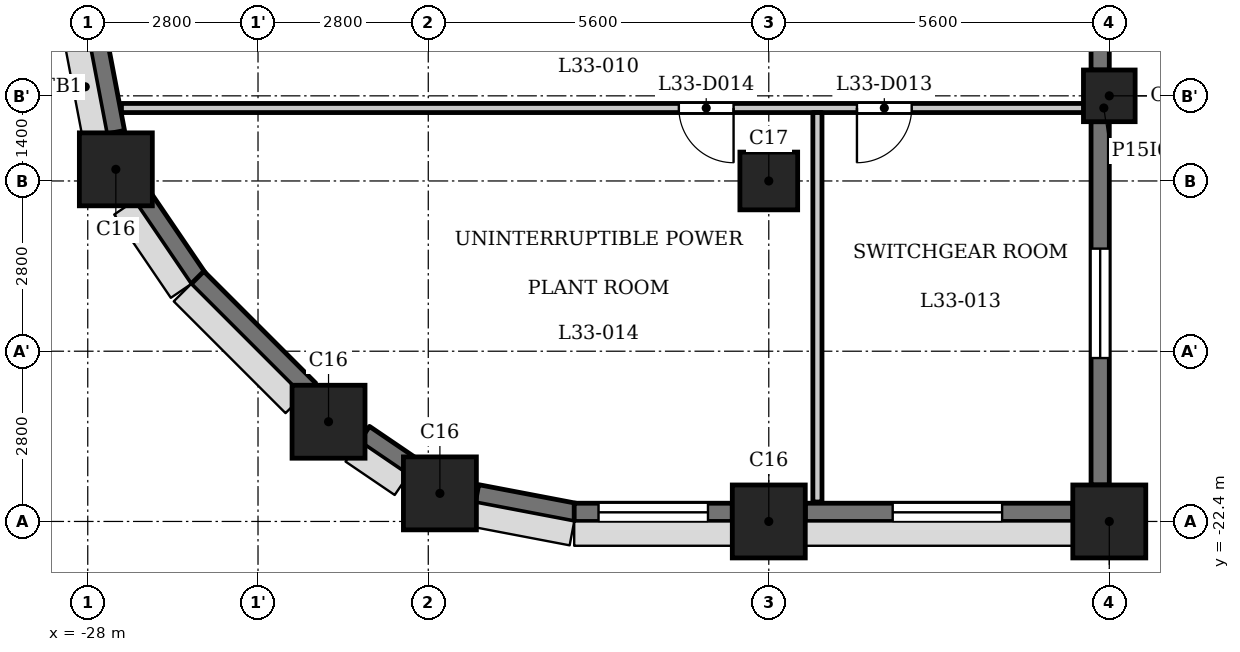
"""IFC4 building model, lengths in metres.
Left out: names, types, materials, properties, quantities, classifications, styles, units other than length and angle.
Written with IfcOpenShell. Run it as: python <this file> out.ifc"""

import sys

from ifc_helpers import new_model, si_unit, direction, frame, frame_2d, origin, origin_2d, place, context, subcontext, project, spatial, rectangle, extrude, element, fill, save


model = new_model("IFC4")
c1 = context("Model", 3, precision=1e-05, world=origin(), true_north=direction((0.0, 1.0)))
c2 = subcontext(c1, "Body", "Model", "MODEL_VIEW")
j1 = project(units=[si_unit("LENGTHUNIT", "METRE"), si_unit("PLANEANGLEUNIT", "RADIAN")], contexts=[c1])
p1 = place(None, origin())
s1 = spatial("IfcSite", under=j1, at=p1, CompositionType="ELEMENT")
p2 = place(p1, origin())
s2 = spatial("IfcBuilding", under=s1, at=p2, CompositionType="ELEMENT")
p3 = place(p2, frame((0.0, 0.0, 130.7)))
s3 = spatial("IfcBuildingStorey", under=s2, at=p3, CompositionType="ELEMENT", Elevation=130.7)
for number, where, z_axis, x_axis in (
    (1, (-22.209, -21.938, 0.0), (0.0, 0.0, 1.0), (1.0, 0.0, 0.0)),
    (2, (-16.8, -22.4, 0.0), (0.0, 0.0, 1.0), (1.0, 0.0, 0.0)),
    (3, (-11.2, -22.4, 0.0), (0.0, 0.0, 1.0), (1.0, 0.0, 0.0)),
    (4, (-27.538, -16.609, 0.0), (0.0, 0.0, 1.0), (1.0, 0.0, 0.0)),
    (5, (-24.04, -20.76, 0.0), (0.0, 0.0, 1.0), (1.0, 0.0, 0.0)),
):
    element("IfcColumn", number, at=place(p3, frame(where, z_axis=z_axis, x_axis=x_axis)), inside=s3, PredefinedType="COLUMN", context=c2, shape_type="SweptSolid", body=[
        extrude(rectangle(XDim=1.2, YDim=1.2, at=origin_2d()), origin(), (0.0, 0.0, 1.0), 5.4),
    ])
p4 = place(p3, frame((-16.8, -16.8, 0.0), z_axis=(0.0, 0.0, 1.0), x_axis=(1.0, 0.0, 0.0)))
e6 = element("IfcColumn", 6, at=p4, inside=s3, PredefinedType="COLUMN", context=c2, shape_type="SweptSolid", body=[
    extrude(rectangle(XDim=0.95, YDim=0.95, at=origin_2d()), origin(), (0.0, 0.0, 1.0), 5.4),
])
p5 = place(p3, frame((-11.2, -15.4, 0.0), z_axis=(0.0, 0.0, 1.0), x_axis=(1.0, 0.0, 0.0)))
e7 = element("IfcColumn", 7, at=p5, inside=s3, PredefinedType="COLUMN", context=c2, shape_type="SweptSolid", body=[
    extrude(rectangle(XDim=0.85, YDim=0.85, at=origin_2d()), origin(), (0.0, 0.0, 1.0), 5.4),
])
for number, where, z_axis, x_axis in (
    (8, (-27.853, -14.372, 0.0), (0.0, 0.0, 1.0), (0.187, -0.982, 0.0)),
    (9, (-27.11, -17.043, 0.0), (0.0, 0.0, 1.0), (0.562, -0.827, 0.0)),
):
    element("IfcWall", number, at=place(p3, frame(where, z_axis=z_axis, x_axis=x_axis)), inside=s3, PredefinedType="SOLIDWALL", context=c2, shape_type="SweptSolid", body=[
        extrude(rectangle(XDim=1.656, YDim=0.3, at=frame_2d((0.828, 0.0))), origin(), (0.0, 0.0, 1.0), 4.3),
    ])
p6 = place(p3, frame((-26.197, -18.391, 0.0), z_axis=(0.0, 0.0, 1.0), x_axis=(0.707059830104, -0.707153729152, 0.0)))
e10 = element("IfcWall", 10, at=p6, inside=s3, PredefinedType="SOLIDWALL", context=c2, shape_type="SweptSolid", body=[
    extrude(rectangle(XDim=2.6, YDim=0.3, at=frame_2d((1.3, 0.0))), origin(), (0.0, 0.0, 1.0), 4.3),
])
p7 = place(p3, frame((-23.451, -20.96, 0.0), z_axis=(0.0, 0.0, 1.0), x_axis=(0.827019434577, -0.562173331661, 0.0)))
e11 = element("IfcWall", 11, at=p7, inside=s3, PredefinedType="SOLIDWALL", context=c2, shape_type="SweptSolid", body=[
    extrude(rectangle(XDim=0.977, YDim=0.3, at=frame_2d((0.489, 0.0))), origin(), (0.0, 0.0, 1.0), 5.1),
])
p8 = place(p3, frame((-21.599, -21.942, 0.0), z_axis=(0.0, 0.0, 1.0), x_axis=(0.98228820662, -0.187376303559, 0.0)))
e12 = element("IfcWall", 12, at=p8, inside=s3, PredefinedType="SOLIDWALL", context=c2, shape_type="SweptSolid", body=[
    extrude(rectangle(XDim=1.656, YDim=0.3, at=frame_2d((0.828, 0.0))), origin(), (0.0, 0.0, 1.0), 4.3),
])
p9 = place(p3, frame((-20.0, -22.25, 0.0), z_axis=(0.0, 0.0, 1.0), x_axis=(1.0, 0.0, 0.0)))
e13 = element("IfcWall", 13, at=p9, inside=s3, PredefinedType="SOLIDWALL", context=c2, shape_type="SweptSolid", body=[
    extrude(rectangle(XDim=2.6, YDim=0.3, at=frame_2d((1.3, 0.0))), origin(), (0.0, 0.0, 1.0), 4.3),
])
p10 = place(p9, frame((0.4, 0.0, 0.9)))
e14 = element("IfcOpeningElement", 14, at=p10, cuts=e13, PredefinedType="OPENING", context=c2, shape_type="SweptSolid", body=[
    extrude(rectangle(XDim=1.8, YDim=1.5, at=frame_2d((0.9, 0.75))), frame((0.0, 0.16, 0.0), z_axis=(0.0, -1.0, 0.0), x_axis=(1.0, 0.0, 0.0)), (0.0, 0.0, 1.0), 0.32),
])
p11 = place(p3, frame((-16.2, -22.25, 0.0), z_axis=(0.0, 0.0, 1.0), x_axis=(1.0, 0.0, 0.0)))
e15 = element("IfcWall", 15, at=p11, inside=s3, PredefinedType="SOLIDWALL", context=c2, shape_type="SweptSolid", body=[
    extrude(rectangle(XDim=4.4, YDim=0.3, at=frame_2d((2.2, 0.0))), origin(), (0.0, 0.0, 1.0), 4.3),
])
p12 = place(p11, frame((1.438, 0.0, 0.9)))
e16 = element("IfcOpeningElement", 16, at=p12, cuts=e15, PredefinedType="OPENING", context=c2, shape_type="SweptSolid", body=[
    extrude(rectangle(XDim=1.8, YDim=1.5, at=frame_2d((0.9, 0.75))), frame((0.0, 0.16, 0.0), z_axis=(0.0, -1.0, 0.0), x_axis=(1.0, 0.0, 0.0)), (0.0, 0.0, 1.0), 0.32),
])
p13 = place(p3, frame((-11.35, -21.8, 0.0), z_axis=(0.0, 0.0, 1.0), x_axis=(0.0, 1.0, 0.0)))
e17 = element("IfcWall", 17, at=p13, inside=s3, PredefinedType="SOLIDWALL", context=c2, shape_type="SweptSolid", body=[
    extrude(rectangle(XDim=5.975, YDim=0.3, at=frame_2d((2.988, 0.0))), origin(), (0.0, 0.0, 1.0), 5.1),
])
p14 = place(p13, frame((2.087, 0.0, 0.9)))
e18 = element("IfcOpeningElement", 18, at=p14, cuts=e17, PredefinedType="OPENING", context=c2, shape_type="SweptSolid", body=[
    extrude(rectangle(XDim=1.8, YDim=1.5, at=frame_2d((0.9, 0.75))), frame((0.0, 0.16, 0.0), z_axis=(0.0, -1.0, 0.0), x_axis=(1.0, 0.0, 0.0)), (0.0, 0.0, 1.0), 0.32),
])
p15 = place(p3, frame((-11.35, -14.975, 0.0), z_axis=(0.0, 0.0, 1.0), x_axis=(0.0, 1.0, 0.0)))
e19 = element("IfcWall", 19, at=p15, inside=s3, PredefinedType="SOLIDWALL", context=c2, shape_type="SweptSolid", body=[
    extrude(rectangle(XDim=6.1, YDim=0.3, at=frame_2d((3.05, 0.0))), origin(), (0.0, 0.0, 1.0), 5.1),
])
p16 = place(p15, frame((3.075, 0.0, 0.9)))
e20 = element("IfcOpeningElement", 20, at=p16, cuts=e19, PredefinedType="OPENING", context=c2, shape_type="SweptSolid", body=[
    extrude(rectangle(XDim=1.8, YDim=1.5, at=frame_2d((0.9, 0.75))), frame((0.0, 0.16, 0.0), z_axis=(0.0, -1.0, 0.0), x_axis=(1.0, 0.0, 0.0)), (0.0, 0.0, 1.0), 0.32),
])
p17 = place(p3, frame((-27.446, -15.6, 0.0), z_axis=(0.0, 0.0, 1.0), x_axis=(1.0, 0.0, 0.0)))
e21 = element("IfcWall", 21, at=p17, inside=s3, PredefinedType="PARTITIONING", context=c2, shape_type="SweptSolid", body=[
    extrude(rectangle(XDim=16.156, YDim=0.15, at=frame_2d((8.078, 0.0))), origin(), (0.0, 0.0, 1.0), 5.1),
])
p18 = place(p17, frame((12.096, 0.0, 0.0)))
e22 = element("IfcOpeningElement", 22, at=p18, cuts=e21, PredefinedType="OPENING", context=c2, shape_type="SweptSolid", body=[
    extrude(rectangle(XDim=0.9, YDim=2.1, at=frame_2d((0.45, 1.05))), frame((0.0, 0.085, 0.0), z_axis=(0.0, -1.0, 0.0), x_axis=(1.0, 0.0, 0.0)), (0.0, 0.0, 1.0), 0.17),
])
p19 = place(p17, frame((9.167, 0.0, 0.0)))
e23 = element("IfcOpeningElement", 23, at=p19, cuts=e21, PredefinedType="OPENING", context=c2, shape_type="SweptSolid", body=[
    extrude(rectangle(XDim=0.9, YDim=2.1, at=frame_2d((0.45, 1.05))), frame((0.0, 0.085, 0.0), z_axis=(0.0, -1.0, 0.0), x_axis=(1.0, 0.0, 0.0)), (0.0, 0.0, 1.0), 0.17),
])
p20 = place(p3, frame((-16.0, -22.08, 0.0), z_axis=(0.0, 0.0, 1.0), x_axis=(0.0, 1.0, 0.0)))
e24 = element("IfcWall", 24, at=p20, inside=s3, PredefinedType="PARTITIONING", context=c2, shape_type="SweptSolid", body=[
    extrude(rectangle(XDim=6.405, YDim=0.15, at=frame_2d((3.203, 0.0))), origin(), (0.0, 0.0, 1.0), 5.1),
])
p21 = place(p18, origin())
e25 = element("IfcDoor", 25, at=p21, inside=s3, OperationType="SINGLE_SWING_LEFT", PredefinedType="DOOR", context=c2, shape_type="SweptSolid", body=[
    extrude(rectangle(XDim=0.9, YDim=2.1, at=frame_2d((0.45, 1.05))), frame((0.0, 0.025, 0.0), z_axis=(0.0, -1.0, 0.0), x_axis=(1.0, 0.0, 0.0)), (0.0, 0.0, 1.0), 0.05),
])
fill(e22, e25)
p22 = place(p19, origin())
e26 = element("IfcDoor", 26, at=p22, inside=s3, OperationType="SINGLE_SWING_RIGHT", PredefinedType="DOOR", context=c2, shape_type="SweptSolid", body=[
    extrude(rectangle(XDim=0.9, YDim=2.1, at=frame_2d((0.45, 1.05))), frame((0.0, 0.025, 0.0), z_axis=(0.0, -1.0, 0.0), x_axis=(1.0, 0.0, 0.0)), (0.0, 0.0, 1.0), 0.05),
])
fill(e23, e26)
p23 = place(p10, origin())
e27 = element("IfcWindow", 27, at=p23, inside=s3, PartitioningType="SINGLE_PANEL", PredefinedType="WINDOW", context=c2, shape_type="SweptSolid", body=[
    extrude(rectangle(XDim=1.8, YDim=1.5, at=frame_2d((0.9, 0.75))), frame((0.0, 0.03, 0.0), z_axis=(0.0, -1.0, 0.0), x_axis=(1.0, 0.0, 0.0)), (0.0, 0.0, 1.0), 0.06),
])
fill(e14, e27)
p24 = place(p12, origin())
e28 = element("IfcWindow", 28, at=p24, inside=s3, PartitioningType="SINGLE_PANEL", PredefinedType="WINDOW", context=c2, shape_type="SweptSolid", body=[
    extrude(rectangle(XDim=1.8, YDim=1.5, at=frame_2d((0.9, 0.75))), frame((0.0, 0.03, 0.0), z_axis=(0.0, -1.0, 0.0), x_axis=(1.0, 0.0, 0.0)), (0.0, 0.0, 1.0), 0.06),
])
fill(e16, e28)
p25 = place(p14, origin())
e29 = element("IfcWindow", 29, at=p25, inside=s3, PartitioningType="SINGLE_PANEL", PredefinedType="WINDOW", context=c2, shape_type="SweptSolid", body=[
    extrude(rectangle(XDim=1.8, YDim=1.5, at=frame_2d((0.9, 0.75))), frame((0.0, 0.03, 0.0), z_axis=(0.0, -1.0, 0.0), x_axis=(1.0, 0.0, 0.0)), (0.0, 0.0, 1.0), 0.06),
])
fill(e18, e29)
save(model, sys.argv[1])
